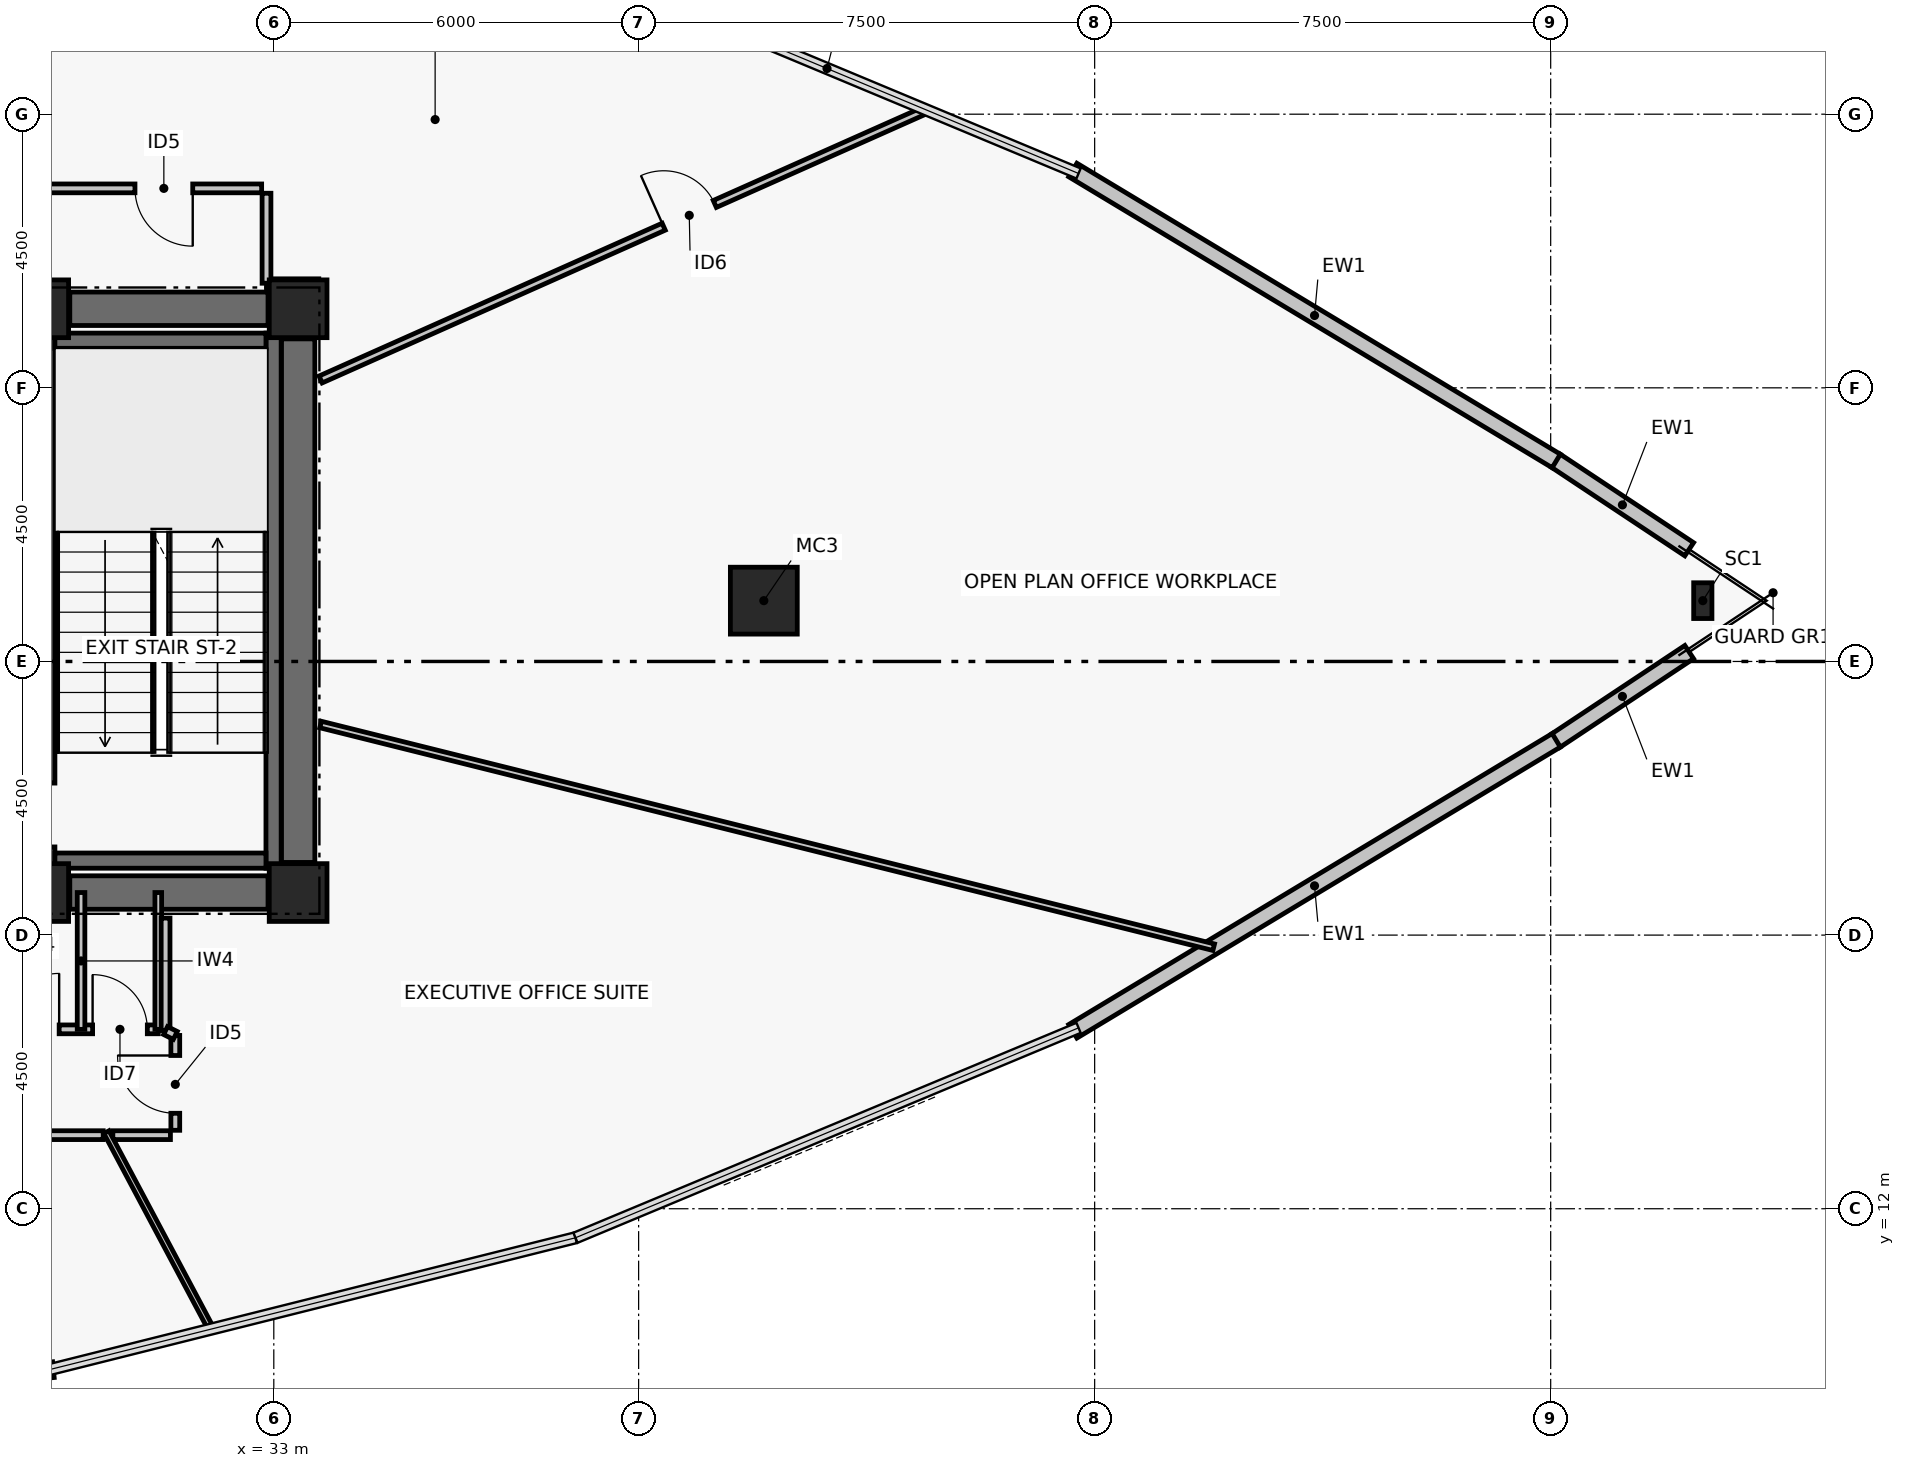
"""IFC4 building model, lengths in metres.
Left out: names, types, materials, properties, quantities, classifications, styles, units other than length and angle.
Written with IfcOpenShell. Run it as: python <this file> out.ifc"""

import sys

from ifc_helpers import new_model, si_unit, direction, frame, frame_2d, origin, origin_2d, place, context, subcontext, project, spatial, rectangle, hollow_rectangle, i_section, extrude, element, fill, save


model = new_model("IFC4")
c1 = context("Model", 3, precision=1e-05, world=origin(), true_north=direction((0.0, 1.0)))
c2 = subcontext(c1, "Body", "Model", "MODEL_VIEW")
j1 = project(units=[si_unit("LENGTHUNIT", "METRE"), si_unit("PLANEANGLEUNIT", "RADIAN")], contexts=[c1])
p1 = place(None, origin())
s1 = spatial("IfcSite", under=j1, at=p1, CompositionType="ELEMENT")
p2 = place(p1, origin())
s2 = spatial("IfcBuilding", under=s1, at=p2, CompositionType="ELEMENT")
p3 = place(p2, frame((0.0, 0.0, 161.76)))
s3 = spatial("IfcBuildingStorey", under=s2, at=p3, CompositionType="ELEMENT", Elevation=161.76)
for number, where, z_axis, x_axis in (
    (1, (29.15, 17.2, 0.0), (0.0, 0.0, 1.0), (1.0, 0.0, 0.0)),
    (2, (33.4, 17.2, 0.0), (0.0, 0.0, 1.0), (1.0, 0.0, 0.0)),
    (3, (29.15, 26.8, 0.0), (0.0, 0.0, 1.0), (1.0, 0.0, 0.0)),
    (4, (33.4, 26.8, 0.0), (0.0, 0.0, 1.0), (1.0, 0.0, 0.0)),
):
    element("IfcColumn", number, at=place(p3, frame(where, z_axis=z_axis, x_axis=x_axis)), inside=s3, PredefinedType="COLUMN", context=c2, shape_type="SweptSolid", body=[
        extrude(rectangle(XDim=0.95, YDim=0.95, at=origin_2d()), origin(), (0.0, 0.0, 1.0), 3.72),
    ])
for number, where, z_axis, x_axis in (
    (5, (29.645, 17.2, 0.0), (0.0, 0.0, 1.0), (1.0, 0.0, 0.0)),
    (6, (29.645, 26.8, 0.0), (0.0, 0.0, 1.0), (1.0, 0.0, 0.0)),
):
    element("IfcWall", number, at=place(p3, frame(where, z_axis=z_axis, x_axis=x_axis)), inside=s3, PredefinedType="SHEAR", context=c2, shape_type="SweptSolid", body=[
        extrude(rectangle(XDim=3.26, YDim=0.55, at=frame_2d((1.63, 0.0))), origin(), (0.0, 0.0, 1.0), 3.5),
    ])
p4 = place(p3, frame((33.4, 17.695, 0.0), z_axis=(0.0, 0.0, 1.0), x_axis=(0.0, 1.0, 0.0)))
e7 = element("IfcWall", 7, at=p4, inside=s3, PredefinedType="SHEAR", context=c2, shape_type="SweptSolid", body=[
    extrude(rectangle(XDim=8.61, YDim=0.55, at=frame_2d((4.305, 0.0))), origin(), (0.0, 0.0, 1.0), 3.5),
])
p5 = place(p3, frame((29.275, 17.6, 0.0), z_axis=(0.0, 0.0, 1.0), x_axis=(0.0, 1.0, 0.0)))
e8 = element("IfcWall", 8, at=p5, inside=s3, PredefinedType="SHEAR", context=c2, shape_type="SweptSolid", body=[
    extrude(rectangle(XDim=8.8, YDim=0.25, at=frame_2d((4.4, 0.0))), origin(), (0.0, 0.0, 1.0), 3.5),
])
p6 = place(p5, frame((0.35, 0.0, 0.0)))
e9 = element("IfcOpeningElement", 9, at=p6, cuts=e8, PredefinedType="OPENING", context=c2, shape_type="SweptSolid", body=[
    extrude(rectangle(XDim=1.05, YDim=2.08, at=frame_2d((0.525, 1.04))), frame((0.0, 0.135, 0.0), z_axis=(0.0, -1.0, 0.0), x_axis=(1.0, 0.0, 0.0)), (0.0, 0.0, 1.0), 0.27),
])
p7 = place(p3, frame((32.996, 17.6, 0.0), z_axis=(0.0, 0.0, 1.0), x_axis=(0.0, 1.0, 0.0)))
e10 = element("IfcWall", 10, at=p7, inside=s3, PredefinedType="SHEAR", context=c2, shape_type="SweptSolid", body=[
    extrude(rectangle(XDim=8.8, YDim=0.25, at=frame_2d((4.4, 0.0))), origin(), (0.0, 0.0, 1.0), 3.5),
])
for number, where, z_axis, x_axis in (
    (11, (29.4, 17.725, 0.0), (0.0, 0.0, 1.0), (1.0, 0.0, 0.0)),
    (12, (29.4, 26.275, 0.0), (0.0, 0.0, 1.0), (1.0, 0.0, 0.0)),
):
    element("IfcWall", number, at=place(p3, frame(where, z_axis=z_axis, x_axis=x_axis)), inside=s3, PredefinedType="SHEAR", context=c2, shape_type="SweptSolid", body=[
        extrude(rectangle(XDim=3.471, YDim=0.25, at=frame_2d((1.736, 0.0))), origin(), (0.0, 0.0, 1.0), 3.5),
    ])
p8 = place(p3, frame((41.059, 22.0, 0.0), z_axis=(0.0, 0.0, 1.0), x_axis=(1.0, 0.0, 0.0)))
e13 = element("IfcColumn", 13, at=p8, inside=s3, PredefinedType="COLUMN", context=c2, shape_type="SweptSolid", body=[
    extrude(hollow_rectangle(XDim=1.1, YDim=1.1, WallThickness=0.045, at=origin_2d()), origin(), (0.0, 0.0, 1.0), 3.72),
])
p9 = place(p3, frame((56.502, 22.0, 0.0), z_axis=(0.0, 0.0, 1.0), x_axis=(1.0, 0.0, 0.0)))
e14 = element("IfcColumn", 14, at=p9, inside=s3, PredefinedType="COLUMN", context=c2, shape_type="SweptSolid", body=[
    extrude(i_section(OverallWidth=0.3, OverallDepth=0.588, WebThickness=0.012, FlangeThickness=0.02, at=origin_2d()), origin(), (0.0, 0.0, 1.0), 3.72),
])
for number, where, z_axis, x_axis in (
    (15, (56.278, 21.155, 0.0), (0.0, 0.0, 1.0), (-0.833, -0.553, 0.0)),
    (16, (54.081, 24.304, 0.0), (0.0, 0.0, 1.0), (0.833, -0.553, 0.0)),
):
    element("IfcWall", number, at=place(p3, frame(where, z_axis=z_axis, x_axis=x_axis)), inside=s3, PredefinedType="PARTITIONING", context=c2, shape_type="SweptSolid", body=[
        extrude(rectangle(XDim=2.637, YDim=0.26, at=frame_2d((1.318, 0.0))), origin(), (0.0, 0.0, 1.0), 3.5),
    ])
p10 = place(p3, frame((46.141, 29.082, 0.0), z_axis=(0.0, 0.0, 1.0), x_axis=(0.856788694159, -0.515667658053, 0.0)))
e17 = element("IfcWall", 17, at=p10, inside=s3, PredefinedType="PARTITIONING", context=c2, shape_type="SweptSolid", body=[
    extrude(rectangle(XDim=9.279, YDim=0.26, at=frame_2d((4.64, 0.0))), origin(), (0.0, 0.0, 1.0), 3.5),
])
p11 = place(p3, frame((29.375, 9.354, 0.0), z_axis=(0.0, 0.0, 1.0), x_axis=(-0.9950896707, -0.098977508888, 0.0)))
e18 = element("IfcWall", 18, at=p11, inside=s3, PredefinedType="PARTITIONING", context=c2, shape_type="SweptSolid", body=[
    extrude(rectangle(XDim=9.28, YDim=0.26, at=frame_2d((4.64, 0.0))), origin(), (0.0, 0.0, 1.0), 3.5),
])
p12 = place(p3, frame((54.091, 19.703, 0.0), z_axis=(0.0, 0.0, 1.0), x_axis=(-0.856788694159, -0.515667658053, 0.0)))
e19 = element("IfcWall", 19, at=p12, inside=s3, PredefinedType="PARTITIONING", context=c2, shape_type="SweptSolid", body=[
    extrude(rectangle(XDim=9.279, YDim=0.26, at=frame_2d((4.64, 0.0))), origin(), (0.0, 0.0, 1.0), 3.5),
])
p13 = place(p3, frame((26.88, 14.95, 0.0), z_axis=(0.0, 0.0, 1.0), x_axis=(1.0, 0.0, 0.0)))
e20 = element("IfcWall", 20, at=p13, inside=s3, PredefinedType="PARTITIONING", context=c2, shape_type="SweptSolid", body=[
    extrude(rectangle(XDim=4.22, YDim=0.145, at=frame_2d((2.11, 0.0))), origin(), (0.0, 0.0, 1.0), 2.93),
])
p14 = place(p13, frame((0.2, 0.0, 0.0)))
e21 = element("IfcOpeningElement", 21, at=p14, cuts=e20, PredefinedType="OPENING", context=c2, shape_type="SweptSolid", body=[
    extrude(rectangle(XDim=0.9, YDim=2.02, at=frame_2d((0.45, 1.01))), frame((0.0, 0.083, 0.0), z_axis=(0.0, -1.0, 0.0), x_axis=(1.0, 0.0, 0.0)), (0.0, 0.0, 1.0), 0.165),
])
p15 = place(p13, frame((1.67, 0.0, 0.0)))
e22 = element("IfcOpeningElement", 22, at=p15, cuts=e20, PredefinedType="OPENING", context=c2, shape_type="SweptSolid", body=[
    extrude(rectangle(XDim=0.92, YDim=2.05, at=frame_2d((0.46, 1.025))), frame((0.0, 0.083, 0.0), z_axis=(0.0, -1.0, 0.0), x_axis=(1.0, 0.0, 0.0)), (0.0, 0.0, 1.0), 0.165),
])
p16 = place(p13, frame((3.14, 0.0, 0.0)))
e23 = element("IfcOpeningElement", 23, at=p16, cuts=e20, PredefinedType="OPENING", context=c2, shape_type="SweptSolid", body=[
    extrude(rectangle(XDim=0.9, YDim=2.02, at=frame_2d((0.45, 1.01))), frame((0.0, 0.083, 0.0), z_axis=(0.0, -1.0, 0.0), x_axis=(1.0, 0.0, 0.0)), (0.0, 0.0, 1.0), 0.165),
])
p17 = place(p3, frame((29.83, 14.95, 0.0), z_axis=(0.0, 0.0, 1.0), x_axis=(0.0, 1.0, 0.0)))
e24 = element("IfcWall", 24, at=p17, inside=s3, PredefinedType="PARTITIONING", context=c2, shape_type="SweptSolid", body=[
    extrude(rectangle(XDim=2.25, YDim=0.125, at=frame_2d((1.125, 0.0))), origin(), (0.0, 0.0, 1.0), 2.63),
])
p18 = place(p3, frame((31.1, 14.95, 0.0), z_axis=(0.0, 0.0, 1.0), x_axis=(0.0, 1.0, 0.0)))
e25 = element("IfcWall", 25, at=p18, inside=s3, PredefinedType="PARTITIONING", context=c2, shape_type="SweptSolid", body=[
    extrude(rectangle(XDim=2.25, YDim=0.11, at=frame_2d((1.125, 0.0))), origin(), (0.0, 0.0, 1.0), 2.63),
])
p19 = place(p3, frame((21.006, 13.21, 0.0), z_axis=(0.0, 0.0, 1.0), x_axis=(1.0, 0.0, 0.0)))
e26 = element("IfcWall", 26, at=p19, inside=s3, PredefinedType="PARTITIONING", context=c2, shape_type="SweptSolid", body=[
    extrude(rectangle(XDim=9.189, YDim=0.145, at=frame_2d((4.594, 0.0))), origin(), (0.0, 0.0, 1.0), 2.73),
])
p20 = place(p19, frame((5.098, 0.0, 0.0)))
e27 = element("IfcOpeningElement", 27, at=p20, cuts=e26, PredefinedType="OPENING", context=c2, shape_type="SweptSolid", body=[
    extrude(rectangle(XDim=0.92, YDim=2.05, at=frame_2d((0.46, 1.025))), frame((0.0, 0.083, 0.0), z_axis=(0.0, -1.0, 0.0), x_axis=(1.0, 0.0, 0.0)), (0.0, 0.0, 1.0), 0.165),
])
p21 = place(p3, frame((30.353, 13.21, 0.0), z_axis=(0.0, 0.0, 1.0), x_axis=(1.0, 0.0, 0.0)))
e28 = element("IfcWall", 28, at=p21, inside=s3, PredefinedType="PARTITIONING", context=c2, shape_type="SweptSolid", body=[
    extrude(rectangle(XDim=0.947, YDim=0.145, at=frame_2d((0.474, 0.0))), origin(), (0.0, 0.0, 1.0), 3.5),
])
p22 = place(p3, frame((31.38, 13.29, 0.0), z_axis=(0.0, 0.0, 1.0), x_axis=(0.0, 1.0, 0.0)))
e29 = element("IfcWall", 29, at=p22, inside=s3, PredefinedType="PARTITIONING", context=c2, shape_type="SweptSolid", body=[
    extrude(rectangle(XDim=1.56, YDim=0.145, at=frame_2d((0.78, 0.0))), origin(), (0.0, 0.0, 1.0), 3.5),
])
p23 = place(p22, frame((0.28, 0.0, 0.0)))
e30 = element("IfcOpeningElement", 30, at=p23, cuts=e29, PredefinedType="OPENING", context=c2, shape_type="SweptSolid", body=[
    extrude(rectangle(XDim=0.95, YDim=2.06, at=frame_2d((0.475, 1.03))), frame((0.0, 0.083, 0.0), z_axis=(0.0, -1.0, 0.0), x_axis=(1.0, 0.0, 0.0)), (0.0, 0.0, 1.0), 0.165),
])
p24 = place(p3, frame((31.22, 14.93, 0.0), z_axis=(0.0, 0.0, 1.0), x_axis=(0.0, 1.0, 0.0)))
e31 = element("IfcWall", 31, at=p24, inside=s3, PredefinedType="PARTITIONING", context=c2, shape_type="SweptSolid", body=[
    extrude(rectangle(XDim=1.85, YDim=0.145, at=frame_2d((0.925, 0.0))), origin(), (0.0, 0.0, 1.0), 2.63),
])
p25 = place(p3, frame((33.74, 27.22, 0.0), z_axis=(0.0, 0.0, 1.0), x_axis=(-1.0, 0.0, 0.0)))
e32 = element("IfcWall", 32, at=p25, inside=s3, PredefinedType="PARTITIONING", context=c2, shape_type="SweptSolid", body=[
    extrude(rectangle(XDim=0.86, YDim=0.145, at=frame_2d((0.43, 0.0))), origin(), (0.0, 0.0, 1.0), 2.63),
])
p26 = place(p3, frame((32.88, 27.22, 0.0), z_axis=(0.0, 0.0, 1.0), x_axis=(0.0, 1.0, 0.0)))
e33 = element("IfcWall", 33, at=p26, inside=s3, PredefinedType="PARTITIONING", context=c2, shape_type="SweptSolid", body=[
    extrude(rectangle(XDim=1.48, YDim=0.145, at=frame_2d((0.74, 0.0))), origin(), (0.0, 0.0, 1.0), 2.63),
])
p27 = place(p3, frame((32.8, 28.78, 0.0), z_axis=(0.0, 0.0, 1.0), x_axis=(-1.0, 0.0, 0.0)))
e34 = element("IfcWall", 34, at=p27, inside=s3, PredefinedType="PARTITIONING", context=c2, shape_type="SweptSolid", body=[
    extrude(rectangle(XDim=4.923, YDim=0.145, at=frame_2d((2.462, 0.0))), origin(), (0.0, 0.0, 1.0), 2.93),
])
p28 = place(p27, frame((1.133, 0.0, 0.0)))
e35 = element("IfcOpeningElement", 35, at=p28, cuts=e34, PredefinedType="OPENING", context=c2, shape_type="SweptSolid", body=[
    extrude(rectangle(XDim=0.95, YDim=2.06, at=frame_2d((0.475, 1.03))), frame((0.0, 0.083, 0.0), z_axis=(0.0, -1.0, 0.0), x_axis=(1.0, 0.0, 0.0)), (0.0, 0.0, 1.0), 0.165),
])
p29 = place(p3, frame((33.77, 25.637, 0.0), z_axis=(0.0, 0.0, 1.0), x_axis=(0.913542006179, 0.406744395102, 0.0)))
e36 = element("IfcWall", 36, at=p29, inside=s3, PredefinedType="PARTITIONING", context=c2, shape_type="SweptSolid", body=[
    extrude(rectangle(XDim=10.915, YDim=0.125, at=frame_2d((5.457, 0.0))), origin(), (0.0, 0.0, 1.0), 2.63),
])
p30 = place(p29, frame((6.177, 0.0, 0.0)))
e37 = element("IfcOpeningElement", 37, at=p30, cuts=e36, PredefinedType="OPENING", context=c2, shape_type="SweptSolid", body=[
    extrude(rectangle(XDim=0.92, YDim=2.05, at=frame_2d((0.46, 1.025))), frame((0.0, 0.073, 0.0), z_axis=(0.0, -1.0, 0.0), x_axis=(1.0, 0.0, 0.0)), (0.0, 0.0, 1.0), 0.145),
])
p31 = place(p3, frame((27.787, 28.73, 0.0), z_axis=(0.0, 0.0, 1.0), x_axis=(0.309017664707, 0.951056298491, 0.0)))
e38 = element("IfcWall", 38, at=p31, inside=s3, PredefinedType="PARTITIONING", context=c2, shape_type="SweptSolid", body=[
    extrude(rectangle(XDim=6.133, YDim=0.095, at=frame_2d((3.067, 0.0))), origin(), (0.0, 0.0, 1.0), 2.93),
])
p32 = place(p3, frame((30.247, 13.26, 0.0), z_axis=(0.0, 0.0, 1.0), x_axis=(0.469475406562, -0.882945549076, 0.0)))
e39 = element("IfcWall", 39, at=p32, inside=s3, PredefinedType="PARTITIONING", context=c2, shape_type="SweptSolid", body=[
    extrude(rectangle(XDim=3.679, YDim=0.095, at=frame_2d((1.84, 0.0))), origin(), (0.0, 0.0, 1.0), 3.5),
])
p33 = place(p3, frame((33.77, 19.963, 0.0), z_axis=(0.0, 0.0, 1.0), x_axis=(0.970295996232, -0.241920812863, 0.0)))
e40 = element("IfcWall", 40, at=p33, inside=s3, PredefinedType="PARTITIONING", context=c2, shape_type="SweptSolid", body=[
    extrude(rectangle(XDim=15.138, YDim=0.11, at=frame_2d((7.569, 0.0))), origin(), (0.0, 0.0, 1.0), 2.63),
])
p34 = place(p3, frame((31.38, 14.85, 0.0), z_axis=(0.0, 0.0, 1.0), x_axis=(-0.89470021502, 0.446667130247, 0.0)))
e41 = element("IfcWall", 41, at=p34, inside=s3, PredefinedType="PARTITIONING", context=c2, shape_type="SweptSolid", body=[
    extrude(rectangle(XDim=0.179, YDim=0.145, at=frame_2d((0.089, 0.0))), origin(), (0.0, 0.0, 1.0), 3.5),
])
p35 = place(p15, origin())
e42 = element("IfcDoor", 42, at=p35, inside=s3, OperationType="SINGLE_SWING_RIGHT", PredefinedType="DOOR", context=c2, shape_type="SweptSolid", body=[
    extrude(rectangle(XDim=0.92, YDim=2.05, at=frame_2d((0.46, 1.025))), frame((0.0, 0.025, 0.0), z_axis=(0.0, -1.0, 0.0), x_axis=(1.0, 0.0, 0.0)), (0.0, 0.0, 1.0), 0.05),
])
fill(e22, e42)
p36 = place(p16, origin())
e43 = element("IfcDoor", 43, at=p36, inside=s3, OperationType="SINGLE_SWING_LEFT", PredefinedType="DOOR", context=c2, shape_type="SweptSolid", body=[
    extrude(rectangle(XDim=0.9, YDim=2.02, at=frame_2d((0.45, 1.01))), frame((0.0, 0.025, 0.0), z_axis=(0.0, -1.0, 0.0), x_axis=(1.0, 0.0, 0.0)), (0.0, 0.0, 1.0), 0.05),
])
fill(e23, e43)
p37 = place(p23, origin())
e44 = element("IfcDoor", 44, at=p37, inside=s3, OperationType="SINGLE_SWING_RIGHT", PredefinedType="DOOR", context=c2, shape_type="SweptSolid", body=[
    extrude(rectangle(XDim=0.95, YDim=2.06, at=frame_2d((0.475, 1.03))), frame((0.0, 0.025, 0.0), z_axis=(0.0, -1.0, 0.0), x_axis=(1.0, 0.0, 0.0)), (0.0, 0.0, 1.0), 0.05),
])
fill(e30, e44)
p38 = place(p28, origin())
e45 = element("IfcDoor", 45, at=p38, inside=s3, OperationType="SINGLE_SWING_LEFT", PredefinedType="DOOR", context=c2, shape_type="SweptSolid", body=[
    extrude(rectangle(XDim=0.95, YDim=2.06, at=frame_2d((0.475, 1.03))), frame((0.0, 0.025, 0.0), z_axis=(0.0, -1.0, 0.0), x_axis=(1.0, 0.0, 0.0)), (0.0, 0.0, 1.0), 0.05),
])
fill(e35, e45)
p39 = place(p30, origin())
e46 = element("IfcDoor", 46, at=p39, inside=s3, OperationType="SINGLE_SWING_LEFT", PredefinedType="DOOR", context=c2, shape_type="SweptSolid", body=[
    extrude(rectangle(XDim=0.92, YDim=2.05, at=frame_2d((0.46, 1.025))), frame((0.0, 0.025, 0.0), z_axis=(0.0, -1.0, 0.0), x_axis=(1.0, 0.0, 0.0)), (0.0, 0.0, 1.0), 0.05),
])
fill(e37, e46)
save(model, sys.argv[1])
